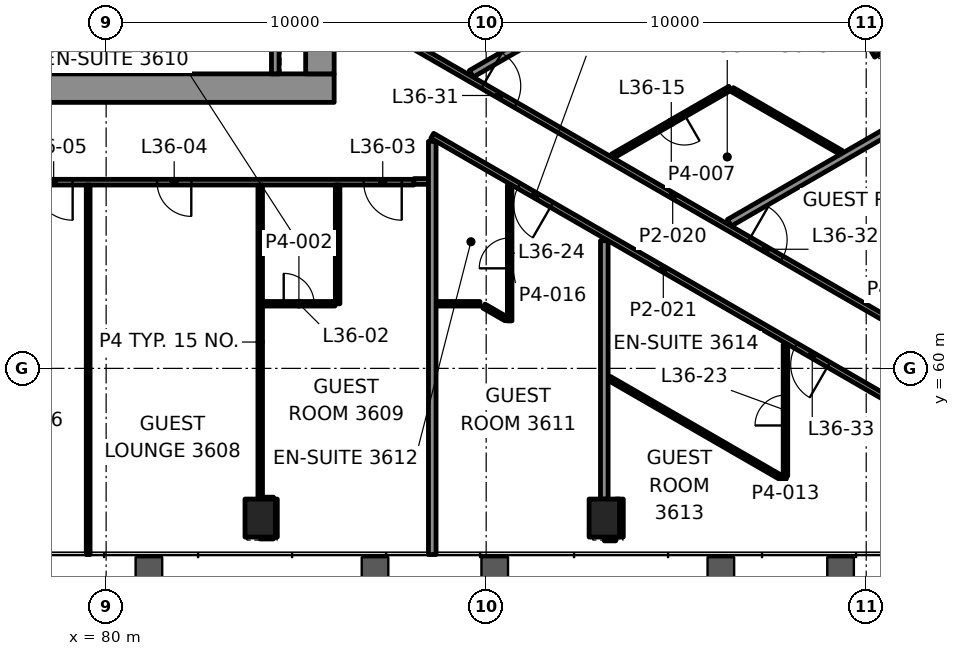
"""IFC4 building model, lengths in metres.
Left out: names, types, materials, properties, quantities, classifications, styles, units other than length and angle.
Written with IfcOpenShell. Run it as: python <this file> out.ifc"""

import sys

from ifc_helpers import new_model, si_unit, direction, frame, frame_2d, origin, origin_2d, place, context, subcontext, project, spatial, rectangle, hollow_rectangle, extrude, element, fill, save


model = new_model("IFC4")
c1 = context("Model", 3, precision=1e-05, world=origin(), true_north=direction((0.0, 1.0)))
c2 = subcontext(c1, "Body", "Model", "MODEL_VIEW")
j1 = project(units=[si_unit("LENGTHUNIT", "METRE"), si_unit("PLANEANGLEUNIT", "RADIAN")], contexts=[c1])
p1 = place(None, origin())
s1 = spatial("IfcSite", under=j1, at=p1, CompositionType="ELEMENT")
p2 = place(p1, origin())
s2 = spatial("IfcBuilding", under=s1, at=p2, CompositionType="ELEMENT")
p3 = place(p2, frame((0.0, 0.0, 159.7)))
s3 = spatial("IfcBuildingStorey", under=s2, at=p3, CompositionType="ELEMENT", Elevation=159.7)
for number, where, z_axis, x_axis in (
    (1, (84.054, 56.061, -0.0), (0.0, 0.0, 1.0), (1.0, 0.0, 0.0)),
    (2, (93.108, 56.061, -0.0), (0.0, 0.0, 1.0), (1.0, 0.0, 0.0)),
    (3, (100.456, 68.788, -0.0), (0.0, 0.0, 1.0), (-0.5, 0.866, 0.0)),
):
    element("IfcColumn", number, at=place(p3, frame(where, z_axis=z_axis, x_axis=x_axis)), inside=s3, PredefinedType="COLUMN", context=c2, shape_type="SweptSolid", body=[
        extrude(hollow_rectangle(XDim=0.8, YDim=1.0, WallThickness=0.05, at=origin_2d()), origin(), (0.0, 0.0, 1.0), 3.9),
    ])
p4 = place(p3, frame((64.0, 67.375, 0.0), z_axis=(0.0, 0.0, 1.0), x_axis=(1.0, 0.0, 0.0)))
e4 = element("IfcWall", 4, at=p4, inside=s3, PredefinedType="SHEAR", context=c2, shape_type="SweptSolid", body=[
    extrude(rectangle(XDim=22.0, YDim=0.75, at=frame_2d((11.0, 0.0))), origin(), (0.0, 0.0, 1.0), 3.7),
])
p5 = place(p4, frame((1.575, 0.0, 0.0)))
e5 = element("IfcOpeningElement", 5, at=p5, cuts=e4, PredefinedType="OPENING", context=c2, shape_type="SweptSolid", body=[
    extrude(rectangle(XDim=0.9, YDim=2.1, at=frame_2d((0.45, 1.05))), frame((0.0, 0.385, 0.0), z_axis=(0.0, -1.0, 0.0), x_axis=(1.0, 0.0, 0.0)), (0.0, 0.0, 1.0), 0.77),
])
p6 = place(p4, frame((4.425, 0.0, 0.0)))
e6 = element("IfcOpeningElement", 6, at=p6, cuts=e4, PredefinedType="OPENING", context=c2, shape_type="SweptSolid", body=[
    extrude(rectangle(XDim=0.9, YDim=2.1, at=frame_2d((0.45, 1.05))), frame((0.0, 0.385, 0.0), z_axis=(0.0, -1.0, 0.0), x_axis=(1.0, 0.0, 0.0)), (0.0, 0.0, 1.0), 0.77),
])
p7 = place(p3, frame((85.625, 67.75, 0.0), z_axis=(0.0, 0.0, 1.0), x_axis=(0.0, 1.0, 0.0)))
e7 = element("IfcWall", 7, at=p7, inside=s3, PredefinedType="SHEAR", context=c2, shape_type="SweptSolid", body=[
    extrude(rectangle(XDim=14.5, YDim=0.75, at=frame_2d((7.25, 0.0))), origin(), (0.0, 0.0, 1.0), 3.7),
])
p8 = place(p7, frame((4.65, 0.0, 0.0)))
e8 = element("IfcOpeningElement", 8, at=p8, cuts=e7, PredefinedType="OPENING", context=c2, shape_type="SweptSolid", body=[
    extrude(rectangle(XDim=1.8, YDim=2.1, at=frame_2d((0.9, 1.05))), frame((0.0, 0.385, 0.0), z_axis=(0.0, -1.0, 0.0), x_axis=(1.0, 0.0, 0.0)), (0.0, 0.0, 1.0), 0.77),
])
p9 = place(p7, frame((11.8, 0.0, 0.0)))
e9 = element("IfcOpeningElement", 9, at=p9, cuts=e7, PredefinedType="OPENING", context=c2, shape_type="SweptSolid", body=[
    extrude(rectangle(XDim=0.9, YDim=2.1, at=frame_2d((0.45, 1.05))), frame((0.0, 0.385, 0.0), z_axis=(0.0, -1.0, 0.0), x_axis=(1.0, 0.0, 0.0)), (0.0, 0.0, 1.0), 0.77),
])
p10 = place(p3, frame((84.054, 55.561, 0.0), z_axis=(0.0, 0.0, 1.0), x_axis=(1.0, 0.0, 0.0)))
e10 = element("IfcWall", 10, at=p10, inside=s3, PredefinedType="PARTITIONING", context=c2, shape_type="SweptSolid", body=[
    extrude(rectangle(XDim=0.35, YDim=0.1, at=frame_2d((0.175, 0.0))), origin(), (0.0, 0.0, 1.0), 3.1),
])
p11 = place(p3, frame((93.108, 55.561, 0.0), z_axis=(0.0, 0.0, 1.0), x_axis=(1.0, 0.0, 0.0)))
e11 = element("IfcWall", 11, at=p11, inside=s3, PredefinedType="PARTITIONING", context=c2, shape_type="SweptSolid", body=[
    extrude(rectangle(XDim=0.3, YDim=0.2, at=frame_2d((0.15, 0.0))), origin(), (0.0, 0.0, 1.0), 3.1),
])
p12 = place(p3, frame((84.114, 56.561, 0.0), z_axis=(0.0, 0.0, 1.0), x_axis=(1.0, 0.0, 0.0)))
e12 = element("IfcWall", 12, at=p12, inside=s3, PredefinedType="PARTITIONING", context=c2, shape_type="SweptSolid", body=[
    extrude(rectangle(XDim=0.29, YDim=0.1, at=frame_2d((0.145, 0.0))), origin(), (0.0, 0.0, 1.0), 3.1),
])
p13 = place(p3, frame((84.124, 61.7, 0.0), z_axis=(0.0, 0.0, 1.0), x_axis=(1.0, 0.0, 0.0)))
e13 = element("IfcWall", 13, at=p13, inside=s3, PredefinedType="PARTITIONING", context=c2, shape_type="SweptSolid", body=[
    extrude(rectangle(XDim=1.897, YDim=0.12, at=frame_2d((0.949, 0.0))), origin(), (0.0, 0.0, 1.0), 3.1),
])
p14 = place(p13, frame((0.549, 0.0, 0.0)))
e14 = element("IfcOpeningElement", 14, at=p14, cuts=e13, PredefinedType="OPENING", context=c2, shape_type="SweptSolid", body=[
    extrude(rectangle(XDim=0.8, YDim=2.1, at=frame_2d((0.4, 1.05))), frame((0.0, 0.07, 0.0), z_axis=(0.0, -1.0, 0.0), x_axis=(1.0, 0.0, 0.0)), (0.0, 0.0, 1.0), 0.14),
])
p15 = place(p3, frame((88.691, 61.7, 0.0), z_axis=(0.0, 0.0, 1.0), x_axis=(1.0, 0.0, 0.0)))
e15 = element("IfcWall", 15, at=p15, inside=s3, PredefinedType="PARTITIONING", context=c2, shape_type="SweptSolid", body=[
    extrude(rectangle(XDim=1.145, YDim=0.12, at=frame_2d((0.573, 0.0))), origin(), (0.0, 0.0, 1.0), 3.1),
])
p16 = place(p3, frame((88.1, 64.9, 0.0), z_axis=(0.0, 0.0, 1.0), x_axis=(-1.0, 0.0, 0.0)))
e16 = element("IfcWall", 16, at=p16, inside=s3, PredefinedType="PARTITIONING", context=c2, shape_type="SweptSolid", body=[
    extrude(rectangle(XDim=26.199, YDim=0.15, at=frame_2d((13.1, 0.0))), origin(), (0.0, 0.0, 1.0), 3.1),
])
p17 = place(p16, frame((0.322, 0.0, 0.0)))
e17 = element("IfcOpeningElement", 17, at=p17, cuts=e16, PredefinedType="OPENING", context=c2, shape_type="SweptSolid", body=[
    extrude(rectangle(XDim=1.0, YDim=2.1, at=frame_2d((0.5, 1.05))), frame((0.0, 0.085, 0.0), z_axis=(0.0, -1.0, 0.0), x_axis=(1.0, 0.0, 0.0)), (0.0, 0.0, 1.0), 0.17),
])
p18 = place(p16, frame((5.859, 0.0, 0.0)))
e18 = element("IfcOpeningElement", 18, at=p18, cuts=e16, PredefinedType="OPENING", context=c2, shape_type="SweptSolid", body=[
    extrude(rectangle(XDim=0.9, YDim=2.1, at=frame_2d((0.45, 1.05))), frame((0.0, 0.085, 0.0), z_axis=(0.0, -1.0, 0.0), x_axis=(1.0, 0.0, 0.0)), (0.0, 0.0, 1.0), 0.17),
])
p19 = place(p16, frame((8.981, 0.0, 0.0)))
e19 = element("IfcOpeningElement", 19, at=p19, cuts=e16, PredefinedType="OPENING", context=c2, shape_type="SweptSolid", body=[
    extrude(rectangle(XDim=1.0, YDim=2.1, at=frame_2d((0.5, 1.05))), frame((0.0, 0.085, 0.0), z_axis=(0.0, -1.0, 0.0), x_axis=(1.0, 0.0, 0.0)), (0.0, 0.0, 1.0), 0.17),
])
p20 = place(p16, frame((16.611, 0.0, 0.0)))
e20 = element("IfcOpeningElement", 20, at=p20, cuts=e16, PredefinedType="OPENING", context=c2, shape_type="SweptSolid", body=[
    extrude(rectangle(XDim=0.9, YDim=2.1, at=frame_2d((0.45, 1.05))), frame((0.0, 0.085, 0.0), z_axis=(0.0, -1.0, 0.0), x_axis=(1.0, 0.0, 0.0)), (0.0, 0.0, 1.0), 0.17),
])
p21 = place(p16, frame((20.006, 0.0, 0.0)))
e21 = element("IfcOpeningElement", 21, at=p21, cuts=e16, PredefinedType="OPENING", context=c2, shape_type="SweptSolid", body=[
    extrude(rectangle(XDim=0.9, YDim=2.1, at=frame_2d((0.45, 1.05))), frame((0.0, 0.085, 0.0), z_axis=(0.0, -1.0, 0.0), x_axis=(1.0, 0.0, 0.0)), (0.0, 0.0, 1.0), 0.17),
])
p22 = place(p16, frame((23.575, 0.0, 0.0)))
e22 = element("IfcOpeningElement", 22, at=p22, cuts=e16, PredefinedType="OPENING", context=c2, shape_type="SweptSolid", body=[
    extrude(rectangle(XDim=1.0, YDim=2.1, at=frame_2d((0.5, 1.05))), frame((0.0, 0.085, 0.0), z_axis=(0.0, -1.0, 0.0), x_axis=(1.0, 0.0, 0.0)), (0.0, 0.0, 1.0), 0.17),
])
p23 = place(p3, frame((88.1, 64.919, 0.0), z_axis=(0.0, 0.0, 1.0), x_axis=(1.0, 0.0, 0.0)))
e23 = element("IfcWall", 23, at=p23, inside=s3, PredefinedType="PARTITIONING", context=c2, shape_type="SweptSolid", body=[
    extrude(rectangle(XDim=0.381, YDim=0.15, at=frame_2d((0.19, 0.0))), origin(), (0.0, 0.0, 1.0), 3.1),
])
p24 = place(p3, frame((96.399, 63.831, 0.0), z_axis=(0.0, 0.0, 1.0), x_axis=(0.86602358327, 0.50000315321, 0.0)))
e24 = element("IfcWall", 24, at=p24, inside=s3, PredefinedType="PARTITIONING", context=c2, shape_type="SweptSolid", body=[
    extrude(rectangle(XDim=6.952, YDim=0.2, at=frame_2d((3.476, 0.0))), origin(), (0.0, 0.0, 1.0), 3.1),
])
p25 = place(p3, frame((96.416, 67.37, 0.0), z_axis=(0.0, 0.0, 1.0), x_axis=(-0.866028357664, -0.499994883695, 0.0)))
e25 = element("IfcWall", 25, at=p25, inside=s3, PredefinedType="PARTITIONING", context=c2, shape_type="SweptSolid", body=[
    extrude(rectangle(XDim=3.568, YDim=0.12, at=frame_2d((1.784, 0.0))), origin(), (0.0, 0.0, 1.0), 3.1),
])
p26 = place(p25, frame((1.384, 0.0, 0.0)))
e26 = element("IfcOpeningElement", 26, at=p26, cuts=e25, PredefinedType="OPENING", context=c2, shape_type="SweptSolid", body=[
    extrude(rectangle(XDim=0.8, YDim=2.1, at=frame_2d((0.4, 1.05))), frame((0.0, 0.07, 0.0), z_axis=(0.0, -1.0, 0.0), x_axis=(1.0, 0.0, 0.0)), (0.0, 0.0, 1.0), 0.14),
])
p27 = place(p3, frame((89.608, 67.752, 0.0), z_axis=(0.0, 0.0, 1.0), x_axis=(0.86602628359, 0.499998476129, 0.0)))
e27 = element("IfcWall", 27, at=p27, inside=s3, PredefinedType="PARTITIONING", context=c2, shape_type="SweptSolid", body=[
    extrude(rectangle(XDim=10.872, YDim=0.2, at=frame_2d((5.436, 0.0))), origin(), (0.0, 0.0, 1.0), 2.865),
])
p28 = place(p3, frame((97.875, 57.168, 0.0), z_axis=(0.0, 0.0, 1.0), x_axis=(0.0, 1.0, 0.0)))
e28 = element("IfcWall", 28, at=p28, inside=s3, PredefinedType="PARTITIONING", context=c2, shape_type="SweptSolid", body=[
    extrude(rectangle(XDim=3.459, YDim=0.12, at=frame_2d((1.729, 0.0))), origin(), (0.0, 0.0, 1.0), 3.1),
])
p29 = place(p28, frame((1.33, 0.0, 0.0)))
e29 = element("IfcOpeningElement", 29, at=p29, cuts=e28, PredefinedType="OPENING", context=c2, shape_type="SweptSolid", body=[
    extrude(rectangle(XDim=0.8, YDim=2.1, at=frame_2d((0.4, 1.05))), frame((0.0, 0.07, 0.0), z_axis=(0.0, -1.0, 0.0), x_axis=(1.0, 0.0, 0.0)), (0.0, 0.0, 1.0), 0.14),
])
p30 = place(p3, frame((93.508, 55.562, 0.0), z_axis=(0.0, 0.0, 1.0), x_axis=(0.0, 1.0, 0.0)))
e30 = element("IfcWall", 30, at=p30, inside=s3, PredefinedType="PARTITIONING", context=c2, shape_type="SweptSolid", body=[
    extrude(rectangle(XDim=0.999, YDim=0.2, at=frame_2d((0.5, 0.0))), origin(), (0.0, 0.0, 1.0), 3.1),
])
p31 = place(p3, frame((93.108, 56.561, 0.0), z_axis=(0.0, 0.0, 1.0), x_axis=(0.0, 1.0, 0.0)))
e31 = element("IfcWall", 31, at=p31, inside=s3, PredefinedType="PARTITIONING", context=c2, shape_type="SweptSolid", body=[
    extrude(rectangle(XDim=6.799, YDim=0.2, at=frame_2d((3.399, 0.0))), origin(), (0.0, 0.0, 1.0), 3.1),
])
p32 = place(p3, frame((90.618, 61.249, 0.0), z_axis=(0.0, 0.0, 1.0), x_axis=(0.0, 1.0, 0.0)))
e32 = element("IfcWall", 32, at=p32, inside=s3, PredefinedType="PARTITIONING", context=c2, shape_type="SweptSolid", body=[
    extrude(rectangle(XDim=3.569, YDim=0.12, at=frame_2d((1.784, 0.0))), origin(), (0.0, 0.0, 1.0), 2.947),
])
p33 = place(p32, frame((1.384, 0.0, 0.0)))
e33 = element("IfcOpeningElement", 33, at=p33, cuts=e32, PredefinedType="OPENING", context=c2, shape_type="SweptSolid", body=[
    extrude(rectangle(XDim=0.8, YDim=2.1, at=frame_2d((0.4, 1.05))), frame((0.0, 0.07, 0.0), z_axis=(0.0, -1.0, 0.0), x_axis=(1.0, 0.0, 0.0)), (0.0, 0.0, 1.0), 0.14),
])
p34 = place(p3, frame((88.581, 55.101, 0.0), z_axis=(0.0, 0.0, 1.0), x_axis=(0.0, 1.0, 0.0)))
e34 = element("IfcWall", 34, at=p34, inside=s3, PredefinedType="PARTITIONING", context=c2, shape_type="SweptSolid", body=[
    extrude(rectangle(XDim=10.872, YDim=0.2, at=frame_2d((5.436, 0.0))), origin(), (0.0, 0.0, 1.0), 2.865),
])
p35 = place(p3, frame((86.091, 61.7, 0.0), z_axis=(0.0, 0.0, 1.0), x_axis=(0.0, 1.0, 0.0)))
e35 = element("IfcWall", 35, at=p35, inside=s3, PredefinedType="PARTITIONING", context=c2, shape_type="SweptSolid", body=[
    extrude(rectangle(XDim=3.125, YDim=0.12, at=frame_2d((1.562, 0.0))), origin(), (0.0, 0.0, 1.0), 3.1),
])
p36 = place(p3, frame((84.454, 55.562, 0.0), z_axis=(0.0, 0.0, 1.0), x_axis=(0.0, 1.0, 0.0)))
e36 = element("IfcWall", 36, at=p36, inside=s3, PredefinedType="PARTITIONING", context=c2, shape_type="SweptSolid", body=[
    extrude(rectangle(XDim=0.999, YDim=0.1, at=frame_2d((0.5, 0.0))), origin(), (0.0, 0.0, 1.0), 2.865),
])
p37 = place(p3, frame((84.054, 56.561, 0.0), z_axis=(0.0, 0.0, 1.0), x_axis=(0.0, 1.0, 0.0)))
e37 = element("IfcWall", 37, at=p37, inside=s3, PredefinedType="PARTITIONING", context=c2, shape_type="SweptSolid", body=[
    extrude(rectangle(XDim=8.264, YDim=0.12, at=frame_2d((4.132, 0.0))), origin(), (0.0, 0.0, 1.0), 3.1),
])
p38 = place(p3, frame((79.527, 55.101, 0.0), z_axis=(0.0, 0.0, 1.0), x_axis=(0.0, 1.0, 0.0)))
e38 = element("IfcWall", 38, at=p38, inside=s3, PredefinedType="PARTITIONING", context=c2, shape_type="SweptSolid", body=[
    extrude(rectangle(XDim=9.724, YDim=0.1, at=frame_2d((4.862, 0.0))), origin(), (0.0, 0.0, 1.0), 2.865),
])
p39 = place(p3, frame((99.337, 65.684, 0.0), z_axis=(0.0, 0.0, 1.0), x_axis=(-0.866024373554, 0.500001784407, 0.0)))
e39 = element("IfcWall", 39, at=p39, inside=s3, PredefinedType="PARTITIONING", context=c2, shape_type="SweptSolid", body=[
    extrude(rectangle(XDim=3.304, YDim=0.12, at=frame_2d((1.652, 0.0))), origin(), (0.0, 0.0, 1.0), 3.1),
])
p40 = place(p3, frame((88.175, 68.433, 0.0), z_axis=(0.0, 0.0, 1.0), x_axis=(0.866030530892, -0.499991119485, 0.0)))
e40 = element("IfcWall", 40, at=p40, inside=s3, PredefinedType="PARTITIONING", context=c2, shape_type="SweptSolid", body=[
    extrude(rectangle(XDim=15.549, YDim=0.15, at=frame_2d((7.774, 0.0))), origin(), (0.0, 0.0, 1.0), 3.1),
])
p41 = place(p40, frame((2.003, 0.0, 0.0)))
e41 = element("IfcOpeningElement", 41, at=p41, cuts=e40, PredefinedType="OPENING", context=c2, shape_type="SweptSolid", body=[
    extrude(rectangle(XDim=1.0, YDim=2.1, at=frame_2d((0.5, 1.05))), frame((0.0, 0.085, 0.0), z_axis=(0.0, -1.0, 0.0), x_axis=(1.0, 0.0, 0.0)), (0.0, 0.0, 1.0), 0.17),
])
p42 = place(p40, frame((10.096, 0.0, 0.0)))
e42 = element("IfcOpeningElement", 42, at=p42, cuts=e40, PredefinedType="OPENING", context=c2, shape_type="SweptSolid", body=[
    extrude(rectangle(XDim=1.0, YDim=2.1, at=frame_2d((0.5, 1.05))), frame((0.0, 0.085, 0.0), z_axis=(0.0, -1.0, 0.0), x_axis=(1.0, 0.0, 0.0)), (0.0, 0.0, 1.0), 0.17),
])
p43 = place(p3, frame((100.74, 59.1, 0.0), z_axis=(0.0, 0.0, 1.0), x_axis=(-0.866028060244, 0.499995398849, 0.0)))
e43 = element("IfcWall", 43, at=p43, inside=s3, PredefinedType="PARTITIONING", context=c2, shape_type="SweptSolid", body=[
    extrude(rectangle(XDim=14.04, YDim=0.15, at=frame_2d((7.02, 0.0))), origin(), (0.0, 0.0, 1.0), 2.947),
])
p44 = place(p43, frame((1.994, 0.0, 0.0)))
e44 = element("IfcOpeningElement", 44, at=p44, cuts=e43, PredefinedType="OPENING", context=c2, shape_type="SweptSolid", body=[
    extrude(rectangle(XDim=1.0, YDim=2.1, at=frame_2d((0.5, 1.05))), frame((0.0, 0.085, 0.0), z_axis=(0.0, -1.0, 0.0), x_axis=(1.0, 0.0, 0.0)), (0.0, 0.0, 1.0), 0.17),
])
p45 = place(p43, frame((10.409, 0.0, 0.0)))
e45 = element("IfcOpeningElement", 45, at=p45, cuts=e43, PredefinedType="OPENING", context=c2, shape_type="SweptSolid", body=[
    extrude(rectangle(XDim=1.0, YDim=2.1, at=frame_2d((0.5, 1.05))), frame((0.0, 0.085, 0.0), z_axis=(0.0, -1.0, 0.0), x_axis=(1.0, 0.0, 0.0)), (0.0, 0.0, 1.0), 0.17),
])
p46 = place(p3, frame((97.875, 57.059, 0.0), z_axis=(0.0, 0.0, 1.0), x_axis=(-0.866041187555, 0.499972660711, 0.0)))
e46 = element("IfcWall", 46, at=p46, inside=s3, PredefinedType="PARTITIONING", context=c2, shape_type="SweptSolid", body=[
    extrude(rectangle(XDim=5.349, YDim=0.12, at=frame_2d((2.675, 0.0))), origin(), (0.0, 0.0, 1.0), 3.1),
])
p47 = place(p3, frame((90.523, 61.303, 0.0), z_axis=(0.0, 0.0, 1.0), x_axis=(-0.865913915833, 0.500193053097, 0.0)))
e47 = element("IfcWall", 47, at=p47, inside=s3, PredefinedType="PARTITIONING", context=c2, shape_type="SweptSolid", body=[
    extrude(rectangle(XDim=0.674, YDim=0.12, at=frame_2d((0.337, 0.0))), origin(), (0.0, 0.0, 1.0), 3.1),
])
p48 = place(p3, frame((84.45, 67.75, 0.0), z_axis=(0.0, 0.0, 1.0), x_axis=(0.0, 1.0, 0.0)))
e48 = element("IfcWall", 48, at=p48, inside=s3, PredefinedType="PARTITIONING", context=c2, shape_type="SweptSolid", body=[
    extrude(rectangle(XDim=0.95, YDim=0.2, at=frame_2d((0.475, 0.0))), origin(), (0.0, 0.0, 1.0), 3.7),
])
p49 = place(p14, origin())
e49 = element("IfcDoor", 49, at=p49, inside=s3, OperationType="SINGLE_SWING_LEFT", PredefinedType="DOOR", context=c2, shape_type="SweptSolid", body=[
    extrude(rectangle(XDim=0.8, YDim=2.1, at=frame_2d((0.4, 1.05))), frame((0.0, 0.025, 0.0), z_axis=(0.0, -1.0, 0.0), x_axis=(1.0, 0.0, 0.0)), (0.0, 0.0, 1.0), 0.05),
])
fill(e14, e49)
p50 = place(p17, origin())
e50 = element("IfcDoor", 50, at=p50, inside=s3, OperationType="SINGLE_SWING_LEFT", PredefinedType="DOOR", context=c2, shape_type="SweptSolid", body=[
    extrude(rectangle(XDim=1.0, YDim=2.1, at=frame_2d((0.5, 1.05))), frame((0.0, 0.025, 0.0), z_axis=(0.0, -1.0, 0.0), x_axis=(1.0, 0.0, 0.0)), (0.0, 0.0, 1.0), 0.05),
])
fill(e17, e50)
p51 = place(p18, origin())
e51 = element("IfcDoor", 51, at=p51, inside=s3, OperationType="SINGLE_SWING_RIGHT", PredefinedType="DOOR", context=c2, shape_type="SweptSolid", body=[
    extrude(rectangle(XDim=0.9, YDim=2.1, at=frame_2d((0.45, 1.05))), frame((0.0, 0.025, 0.0), z_axis=(0.0, -1.0, 0.0), x_axis=(1.0, 0.0, 0.0)), (0.0, 0.0, 1.0), 0.05),
])
fill(e18, e51)
p52 = place(p19, origin())
e52 = element("IfcDoor", 52, at=p52, inside=s3, OperationType="SINGLE_SWING_RIGHT", PredefinedType="DOOR", context=c2, shape_type="SweptSolid", body=[
    extrude(rectangle(XDim=1.0, YDim=2.1, at=frame_2d((0.5, 1.05))), frame((0.0, 0.025, 0.0), z_axis=(0.0, -1.0, 0.0), x_axis=(1.0, 0.0, 0.0)), (0.0, 0.0, 1.0), 0.05),
])
fill(e19, e52)
p53 = place(p26, origin())
e53 = element("IfcDoor", 53, at=p53, inside=s3, OperationType="SINGLE_SWING_RIGHT", PredefinedType="DOOR", context=c2, shape_type="SweptSolid", body=[
    extrude(rectangle(XDim=0.8, YDim=2.1, at=frame_2d((0.4, 1.05))), frame((0.0, 0.025, 0.0), z_axis=(0.0, -1.0, 0.0), x_axis=(1.0, 0.0, 0.0)), (0.0, 0.0, 1.0), 0.05),
])
fill(e26, e53)
p54 = place(p29, origin())
e54 = element("IfcDoor", 54, at=p54, inside=s3, OperationType="SINGLE_SWING_LEFT", PredefinedType="DOOR", context=c2, shape_type="SweptSolid", body=[
    extrude(rectangle(XDim=0.8, YDim=2.1, at=frame_2d((0.4, 1.05))), frame((0.0, 0.025, 0.0), z_axis=(0.0, -1.0, 0.0), x_axis=(1.0, 0.0, 0.0)), (0.0, 0.0, 1.0), 0.05),
])
fill(e29, e54)
p55 = place(p33, origin())
e55 = element("IfcDoor", 55, at=p55, inside=s3, OperationType="SINGLE_SWING_LEFT", PredefinedType="DOOR", context=c2, shape_type="SweptSolid", body=[
    extrude(rectangle(XDim=0.8, YDim=2.1, at=frame_2d((0.4, 1.05))), frame((0.0, 0.025, 0.0), z_axis=(0.0, -1.0, 0.0), x_axis=(1.0, 0.0, 0.0)), (0.0, 0.0, 1.0), 0.05),
])
fill(e33, e55)
p56 = place(p41, origin())
e56 = element("IfcDoor", 56, at=p56, inside=s3, OperationType="SINGLE_SWING_LEFT", PredefinedType="DOOR", context=c2, shape_type="SweptSolid", body=[
    extrude(rectangle(XDim=1.0, YDim=2.1, at=frame_2d((0.5, 1.05))), frame((0.0, 0.025, 0.0), z_axis=(0.0, -1.0, 0.0), x_axis=(1.0, 0.0, 0.0)), (0.0, 0.0, 1.0), 0.05),
])
fill(e41, e56)
p57 = place(p42, origin())
e57 = element("IfcDoor", 57, at=p57, inside=s3, OperationType="SINGLE_SWING_LEFT", PredefinedType="DOOR", context=c2, shape_type="SweptSolid", body=[
    extrude(rectangle(XDim=1.0, YDim=2.1, at=frame_2d((0.5, 1.05))), frame((0.0, 0.025, 0.0), z_axis=(0.0, -1.0, 0.0), x_axis=(1.0, 0.0, 0.0)), (0.0, 0.0, 1.0), 0.05),
])
fill(e42, e57)
p58 = place(p44, origin())
e58 = element("IfcDoor", 58, at=p58, inside=s3, OperationType="SINGLE_SWING_RIGHT", PredefinedType="DOOR", context=c2, shape_type="SweptSolid", body=[
    extrude(rectangle(XDim=1.0, YDim=2.1, at=frame_2d((0.5, 1.05))), frame((0.0, 0.025, 0.0), z_axis=(0.0, -1.0, 0.0), x_axis=(1.0, 0.0, 0.0)), (0.0, 0.0, 1.0), 0.05),
])
fill(e44, e58)
p59 = place(p45, origin())
e59 = element("IfcDoor", 59, at=p59, inside=s3, OperationType="SINGLE_SWING_RIGHT", PredefinedType="DOOR", context=c2, shape_type="SweptSolid", body=[
    extrude(rectangle(XDim=1.0, YDim=2.1, at=frame_2d((0.5, 1.05))), frame((0.0, 0.025, 0.0), z_axis=(0.0, -1.0, 0.0), x_axis=(1.0, 0.0, 0.0)), (0.0, 0.0, 1.0), 0.05),
])
fill(e45, e59)
save(model, sys.argv[1])
